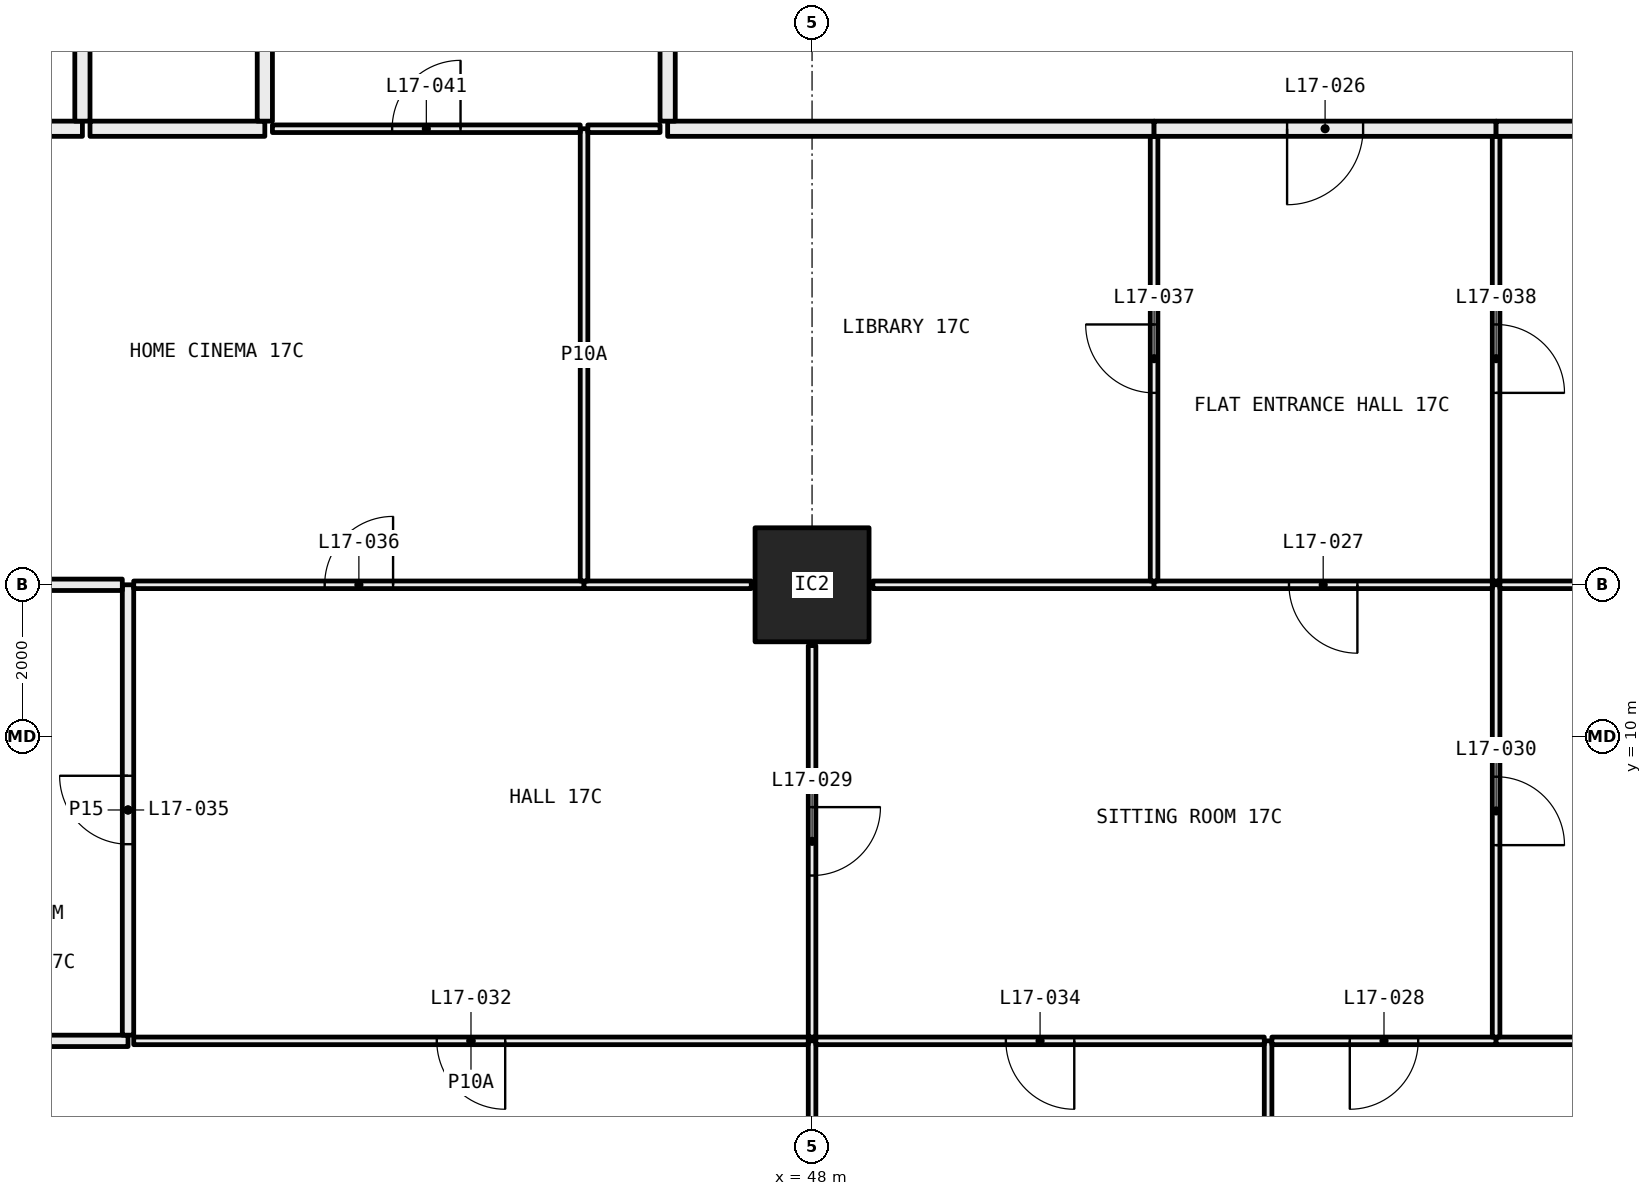
"""IFC4 building model, lengths in metres.
Left out: names, types, materials, properties, quantities, classifications, styles, units other than length and angle.
Written with IfcOpenShell. Run it as: python <this file> out.ifc"""

import sys

from ifc_helpers import new_model, si_unit, direction, frame, frame_2d, origin, origin_2d, place, context, subcontext, project, spatial, rectangle, hollow_rectangle, extrude, element, fill, save


model = new_model("IFC4")
c1 = context("Model", 3, precision=1e-05, world=origin(), true_north=direction((0.0, 1.0)))
c2 = subcontext(c1, "Body", "Model", "MODEL_VIEW")
j1 = project(units=[si_unit("LENGTHUNIT", "METRE"), si_unit("PLANEANGLEUNIT", "RADIAN")], contexts=[c1])
p1 = place(None, origin())
s1 = spatial("IfcSite", under=j1, at=p1, CompositionType="ELEMENT")
p2 = place(p1, origin())
s2 = spatial("IfcBuilding", under=s1, at=p2, CompositionType="ELEMENT")
p3 = place(p2, frame((0.0, 0.0, 71.4)))
s3 = spatial("IfcBuildingStorey", under=s2, at=p3, CompositionType="ELEMENT", Elevation=71.4)
p4 = place(p3, frame((48.0, 12.0, 0.0), z_axis=(0.0, 0.0, 1.0), x_axis=(1.0, 0.0, 0.0)))
e1 = element("IfcColumn", 1, at=p4, inside=s3, PredefinedType="COLUMN", context=c2, shape_type="SweptSolid", body=[
    extrude(hollow_rectangle(XDim=1.5, YDim=1.5, WallThickness=0.065, at=origin_2d()), origin(), (0.0, 0.0, 1.0), 3.05),
])
p5 = place(p3, frame((36.1, 18.0, 0.0), z_axis=(0.0, 0.0, 1.0), x_axis=(1.0, 0.0, 0.0)))
e2 = element("IfcWall", 2, at=p5, inside=s3, PredefinedType="PARTITIONING", context=c2, shape_type="SweptSolid", body=[
    extrude(rectangle(XDim=2.3, YDim=0.2, at=frame_2d((1.15, 0.0))), origin(), (0.0, 0.0, 1.0), 3.05),
])
p6 = place(p3, frame((38.4, 18.1, 0.0), z_axis=(0.0, 0.0, 1.0), x_axis=(0.0, 1.0, 0.0)))
e3 = element("IfcWall", 3, at=p6, inside=s3, PredefinedType="PARTITIONING", context=c2, shape_type="SweptSolid", body=[
    extrude(rectangle(XDim=6.2, YDim=0.2, at=frame_2d((3.1, 0.0))), origin(), (0.0, 0.0, 1.0), 2.45),
])
p7 = place(p3, frame((48.0, 0.72, 0.0), z_axis=(0.0, 0.0, 1.0), x_axis=(0.0, 1.0, 0.0)))
e4 = element("IfcWall", 4, at=p7, inside=s3, PredefinedType="PARTITIONING", context=c2, shape_type="SweptSolid", body=[
    extrude(rectangle(XDim=5.28, YDim=0.1, at=frame_2d((2.64, 0.0))), origin(), (0.0, 0.0, 1.0), 2.45),
])
p8 = place(p3, frame((39.0, 6.0, 0.0), z_axis=(0.0, 0.0, 1.0), x_axis=(-1.0, 0.0, 0.0)))
e5 = element("IfcWall", 5, at=p8, inside=s3, PredefinedType="PARTITIONING", context=c2, shape_type="SweptSolid", body=[
    extrude(rectangle(XDim=2.9, YDim=0.15, at=frame_2d((1.45, 0.0))), origin(), (0.0, 0.0, 1.0), 3.05),
])
p9 = place(p3, frame((47.95, 6.0, 0.0), z_axis=(0.0, 0.0, 1.0), x_axis=(-1.0, 0.0, 0.0)))
e6 = element("IfcWall", 6, at=p9, inside=s3, PredefinedType="PARTITIONING", context=c2, shape_type="SweptSolid", body=[
    extrude(rectangle(XDim=8.875, YDim=0.1, at=frame_2d((4.438, 0.0))), origin(), (0.0, 0.0, 1.0), 2.45),
])
p10 = place(p9, frame((3.988, 0.0, 0.0)))
e7 = element("IfcOpeningElement", 7, at=p10, cuts=e6, PredefinedType="OPENING", context=c2, shape_type="SweptSolid", body=[
    extrude(rectangle(XDim=0.9, YDim=2.1, at=frame_2d((0.45, 1.05))), frame((0.0, 0.06, 0.0), z_axis=(0.0, -1.0, 0.0), x_axis=(1.0, 0.0, 0.0)), (0.0, 0.0, 1.0), 0.12),
])
p11 = place(p3, frame((54.0, 0.72, 0.0), z_axis=(0.0, 0.0, 1.0), x_axis=(0.0, 1.0, 0.0)))
e8 = element("IfcWall", 8, at=p11, inside=s3, PredefinedType="PARTITIONING", context=c2, shape_type="SweptSolid", body=[
    extrude(rectangle(XDim=5.28, YDim=0.1, at=frame_2d((2.64, 0.0))), origin(), (0.0, 0.0, 1.0), 3.05),
])
p12 = place(p3, frame((53.95, 6.0, 0.0), z_axis=(0.0, 0.0, 1.0), x_axis=(-1.0, 0.0, 0.0)))
e9 = element("IfcWall", 9, at=p12, inside=s3, PredefinedType="PARTITIONING", context=c2, shape_type="SweptSolid", body=[
    extrude(rectangle(XDim=5.9, YDim=0.1, at=frame_2d((2.95, 0.0))), origin(), (0.0, 0.0, 1.0), 2.45),
])
p13 = place(p12, frame((2.5, 0.0, 0.0)))
e10 = element("IfcOpeningElement", 10, at=p13, cuts=e9, PredefinedType="OPENING", context=c2, shape_type="SweptSolid", body=[
    extrude(rectangle(XDim=0.9, YDim=2.1, at=frame_2d((0.45, 1.05))), frame((0.0, 0.06, 0.0), z_axis=(0.0, -1.0, 0.0), x_axis=(1.0, 0.0, 0.0)), (0.0, 0.0, 1.0), 0.12),
])
p14 = place(p3, frame((57.0, 6.0, 0.0), z_axis=(0.0, 0.0, 1.0), x_axis=(-1.0, 0.0, 0.0)))
e11 = element("IfcWall", 11, at=p14, inside=s3, PredefinedType="PARTITIONING", context=c2, shape_type="SweptSolid", body=[
    extrude(rectangle(XDim=2.95, YDim=0.1, at=frame_2d((1.475, 0.0))), origin(), (0.0, 0.0, 1.0), 3.05),
])
p15 = place(p14, frame((1.025, 0.0, 0.0)))
e12 = element("IfcOpeningElement", 12, at=p15, cuts=e11, PredefinedType="OPENING", context=c2, shape_type="SweptSolid", body=[
    extrude(rectangle(XDim=0.9, YDim=2.1, at=frame_2d((0.45, 1.05))), frame((0.0, 0.06, 0.0), z_axis=(0.0, -1.0, 0.0), x_axis=(1.0, 0.0, 0.0)), (0.0, 0.0, 1.0), 0.12),
])
p16 = place(p3, frame((59.95, 6.0, 0.0), z_axis=(0.0, 0.0, 1.0), x_axis=(-1.0, 0.0, 0.0)))
e13 = element("IfcWall", 13, at=p16, inside=s3, PredefinedType="PARTITIONING", context=c2, shape_type="SweptSolid", body=[
    extrude(rectangle(XDim=2.95, YDim=0.1, at=frame_2d((1.475, 0.0))), origin(), (0.0, 0.0, 1.0), 2.45),
])
p17 = place(p3, frame((39.0, 6.075, 0.0), z_axis=(0.0, 0.0, 1.0), x_axis=(0.0, 1.0, 0.0)))
e14 = element("IfcWall", 14, at=p17, inside=s3, PredefinedType="PARTITIONING", context=c2, shape_type="SweptSolid", body=[
    extrude(rectangle(XDim=5.925, YDim=0.15, at=frame_2d((2.962, 0.0))), origin(), (0.0, 0.0, 1.0), 2.45),
])
p18 = place(p17, frame((2.512, 0.0, 0.0)))
e15 = element("IfcOpeningElement", 15, at=p18, cuts=e14, PredefinedType="OPENING", context=c2, shape_type="SweptSolid", body=[
    extrude(rectangle(XDim=0.9, YDim=2.1, at=frame_2d((0.45, 1.05))), frame((0.0, 0.085, 0.0), z_axis=(0.0, -1.0, 0.0), x_axis=(1.0, 0.0, 0.0)), (0.0, 0.0, 1.0), 0.17),
])
p19 = place(p3, frame((38.925, 12.0, 0.0), z_axis=(0.0, 0.0, 1.0), x_axis=(-1.0, 0.0, 0.0)))
e16 = element("IfcWall", 16, at=p19, inside=s3, PredefinedType="PARTITIONING", context=c2, shape_type="SweptSolid", body=[
    extrude(rectangle(XDim=2.125, YDim=0.15, at=frame_2d((1.062, 0.0))), origin(), (0.0, 0.0, 1.0), 2.45),
])
p20 = place(p3, frame((48.0, 6.05, 0.0), z_axis=(0.0, 0.0, 1.0), x_axis=(0.0, 1.0, 0.0)))
e17 = element("IfcWall", 17, at=p20, inside=s3, PredefinedType="PARTITIONING", context=c2, shape_type="SweptSolid", body=[
    extrude(rectangle(XDim=5.15, YDim=0.1, at=frame_2d((2.575, 0.0))), origin(), (0.0, 0.0, 1.0), 2.45),
])
p21 = place(p20, frame((2.125, 0.0, 0.0)))
e18 = element("IfcOpeningElement", 18, at=p21, cuts=e17, PredefinedType="OPENING", context=c2, shape_type="SweptSolid", body=[
    extrude(rectangle(XDim=0.9, YDim=2.1, at=frame_2d((0.45, 1.05))), frame((0.0, 0.06, 0.0), z_axis=(0.0, -1.0, 0.0), x_axis=(1.0, 0.0, 0.0)), (0.0, 0.0, 1.0), 0.12),
])
p22 = place(p3, frame((45.0, 12.0, 0.0), z_axis=(0.0, 0.0, 1.0), x_axis=(-1.0, 0.0, 0.0)))
e19 = element("IfcWall", 19, at=p22, inside=s3, PredefinedType="PARTITIONING", context=c2, shape_type="SweptSolid", body=[
    extrude(rectangle(XDim=5.925, YDim=0.1, at=frame_2d((2.962, 0.0))), origin(), (0.0, 0.0, 1.0), 2.45),
])
p23 = place(p22, frame((2.512, 0.0, 0.0)))
e20 = element("IfcOpeningElement", 20, at=p23, cuts=e19, PredefinedType="OPENING", context=c2, shape_type="SweptSolid", body=[
    extrude(rectangle(XDim=0.9, YDim=2.1, at=frame_2d((0.45, 1.05))), frame((0.0, 0.06, 0.0), z_axis=(0.0, -1.0, 0.0), x_axis=(1.0, 0.0, 0.0)), (0.0, 0.0, 1.0), 0.12),
])
p24 = place(p3, frame((47.2, 12.0, 0.0), z_axis=(0.0, 0.0, 1.0), x_axis=(-1.0, 0.0, 0.0)))
e21 = element("IfcWall", 21, at=p24, inside=s3, PredefinedType="PARTITIONING", context=c2, shape_type="SweptSolid", body=[
    extrude(rectangle(XDim=2.2, YDim=0.1, at=frame_2d((1.1, 0.0))), origin(), (0.0, 0.0, 1.0), 2.45),
])
p25 = place(p3, frame((57.0, 6.05, 0.0), z_axis=(0.0, 0.0, 1.0), x_axis=(0.0, 1.0, 0.0)))
e22 = element("IfcWall", 22, at=p25, inside=s3, PredefinedType="PARTITIONING", context=c2, shape_type="SweptSolid", body=[
    extrude(rectangle(XDim=5.95, YDim=0.1, at=frame_2d((2.975, 0.0))), origin(), (0.0, 0.0, 1.0), 2.45),
])
p26 = place(p25, frame((2.525, 0.0, 0.0)))
e23 = element("IfcOpeningElement", 23, at=p26, cuts=e22, PredefinedType="OPENING", context=c2, shape_type="SweptSolid", body=[
    extrude(rectangle(XDim=0.9, YDim=2.1, at=frame_2d((0.45, 1.05))), frame((0.0, 0.06, 0.0), z_axis=(0.0, -1.0, 0.0), x_axis=(1.0, 0.0, 0.0)), (0.0, 0.0, 1.0), 0.12),
])
p27 = place(p3, frame((52.5, 12.0, 0.0), z_axis=(0.0, 0.0, 1.0), x_axis=(-1.0, 0.0, 0.0)))
e24 = element("IfcWall", 24, at=p27, inside=s3, PredefinedType="PARTITIONING", context=c2, shape_type="SweptSolid", body=[
    extrude(rectangle(XDim=3.7, YDim=0.1, at=frame_2d((1.85, 0.0))), origin(), (0.0, 0.0, 1.0), 2.45),
])
p28 = place(p3, frame((56.95, 12.0, 0.0), z_axis=(0.0, 0.0, 1.0), x_axis=(-1.0, 0.0, 0.0)))
e25 = element("IfcWall", 25, at=p28, inside=s3, PredefinedType="PARTITIONING", context=c2, shape_type="SweptSolid", body=[
    extrude(rectangle(XDim=4.45, YDim=0.1, at=frame_2d((2.225, 0.0))), origin(), (0.0, 0.0, 1.0), 2.45),
])
p29 = place(p28, frame((1.775, 0.0, 0.0)))
e26 = element("IfcOpeningElement", 26, at=p29, cuts=e25, PredefinedType="OPENING", context=c2, shape_type="SweptSolid", body=[
    extrude(rectangle(XDim=0.9, YDim=2.1, at=frame_2d((0.45, 1.05))), frame((0.0, 0.06, 0.0), z_axis=(0.0, -1.0, 0.0), x_axis=(1.0, 0.0, 0.0)), (0.0, 0.0, 1.0), 0.12),
])
p30 = place(p3, frame((59.2, 12.0, 0.0), z_axis=(0.0, 0.0, 1.0), x_axis=(-1.0, 0.0, 0.0)))
e27 = element("IfcWall", 27, at=p30, inside=s3, PredefinedType="PARTITIONING", context=c2, shape_type="SweptSolid", body=[
    extrude(rectangle(XDim=2.15, YDim=0.1, at=frame_2d((1.075, 0.0))), origin(), (0.0, 0.0, 1.0), 2.45),
])
p31 = place(p3, frame((45.0, 12.05, 0.0), z_axis=(0.0, 0.0, 1.0), x_axis=(0.0, 1.0, 0.0)))
e28 = element("IfcWall", 28, at=p31, inside=s3, PredefinedType="PARTITIONING", context=c2, shape_type="SweptSolid", body=[
    extrude(rectangle(XDim=5.95, YDim=0.1, at=frame_2d((2.975, 0.0))), origin(), (0.0, 0.0, 1.0), 2.45),
])
p32 = place(p3, frame((44.95, 18.0, 0.0), z_axis=(0.0, 0.0, 1.0), x_axis=(-1.0, 0.0, 0.0)))
e29 = element("IfcWall", 29, at=p32, inside=s3, PredefinedType="PARTITIONING", context=c2, shape_type="SweptSolid", body=[
    extrude(rectangle(XDim=4.05, YDim=0.1, at=frame_2d((2.025, 0.0))), origin(), (0.0, 0.0, 1.0), 3.05),
])
p33 = place(p32, frame((1.575, 0.0, 0.0)))
e30 = element("IfcOpeningElement", 30, at=p33, cuts=e29, PredefinedType="OPENING", context=c2, shape_type="SweptSolid", body=[
    extrude(rectangle(XDim=0.9, YDim=2.1, at=frame_2d((0.45, 1.05))), frame((0.0, 0.06, 0.0), z_axis=(0.0, -1.0, 0.0), x_axis=(1.0, 0.0, 0.0)), (0.0, 0.0, 1.0), 0.12),
])
p34 = place(p3, frame((40.8, 18.0, 0.0), z_axis=(0.0, 0.0, 1.0), x_axis=(-1.0, 0.0, 0.0)))
e31 = element("IfcWall", 31, at=p34, inside=s3, PredefinedType="PARTITIONING", context=c2, shape_type="SweptSolid", body=[
    extrude(rectangle(XDim=2.3, YDim=0.2, at=frame_2d((1.15, 0.0))), origin(), (0.0, 0.0, 1.0), 3.05),
])
p35 = place(p3, frame((52.5, 12.05, 0.0), z_axis=(0.0, 0.0, 1.0), x_axis=(0.0, 1.0, 0.0)))
e32 = element("IfcWall", 32, at=p35, inside=s3, PredefinedType="PARTITIONING", context=c2, shape_type="SweptSolid", body=[
    extrude(rectangle(XDim=5.85, YDim=0.1, at=frame_2d((2.925, 0.0))), origin(), (0.0, 0.0, 1.0), 2.45),
])
p36 = place(p35, frame((2.475, 0.0, 0.0)))
e33 = element("IfcOpeningElement", 33, at=p36, cuts=e32, PredefinedType="OPENING", context=c2, shape_type="SweptSolid", body=[
    extrude(rectangle(XDim=0.9, YDim=2.1, at=frame_2d((0.45, 1.05))), frame((0.0, 0.06, 0.0), z_axis=(0.0, -1.0, 0.0), x_axis=(1.0, 0.0, 0.0)), (0.0, 0.0, 1.0), 0.12),
])
p37 = place(p3, frame((46.0, 18.0, 0.0), z_axis=(0.0, 0.0, 1.0), x_axis=(-1.0, 0.0, 0.0)))
e34 = element("IfcWall", 34, at=p37, inside=s3, PredefinedType="PARTITIONING", context=c2, shape_type="SweptSolid", body=[
    extrude(rectangle(XDim=0.95, YDim=0.1, at=frame_2d((0.475, 0.0))), origin(), (0.0, 0.0, 1.0), 3.05),
])
p38 = place(p3, frame((52.5, 18.0, 0.0), z_axis=(0.0, 0.0, 1.0), x_axis=(-1.0, 0.0, 0.0)))
e35 = element("IfcWall", 35, at=p38, inside=s3, PredefinedType="PARTITIONING", context=c2, shape_type="SweptSolid", body=[
    extrude(rectangle(XDim=6.4, YDim=0.2, at=frame_2d((3.2, 0.0))), origin(), (0.0, 0.0, 1.0), 3.05),
])
p39 = place(p3, frame((57.0, 12.05, 0.0), z_axis=(0.0, 0.0, 1.0), x_axis=(0.0, 1.0, 0.0)))
e36 = element("IfcWall", 36, at=p39, inside=s3, PredefinedType="PARTITIONING", context=c2, shape_type="SweptSolid", body=[
    extrude(rectangle(XDim=5.85, YDim=0.1, at=frame_2d((2.925, 0.0))), origin(), (0.0, 0.0, 1.0), 2.45),
])
p40 = place(p39, frame((2.475, 0.0, 0.0)))
e37 = element("IfcOpeningElement", 37, at=p40, cuts=e36, PredefinedType="OPENING", context=c2, shape_type="SweptSolid", body=[
    extrude(rectangle(XDim=0.9, YDim=2.1, at=frame_2d((0.45, 1.05))), frame((0.0, 0.06, 0.0), z_axis=(0.0, -1.0, 0.0), x_axis=(1.0, 0.0, 0.0)), (0.0, 0.0, 1.0), 0.12),
])
p41 = place(p3, frame((57.0, 18.0, 0.0), z_axis=(0.0, 0.0, 1.0), x_axis=(-1.0, 0.0, 0.0)))
e38 = element("IfcWall", 38, at=p41, inside=s3, PredefinedType="PARTITIONING", context=c2, shape_type="SweptSolid", body=[
    extrude(rectangle(XDim=4.5, YDim=0.2, at=frame_2d((2.25, 0.0))), origin(), (0.0, 0.0, 1.0), 3.05),
])
p42 = place(p41, frame((1.75, 0.0, 0.0)))
e39 = element("IfcOpeningElement", 39, at=p42, cuts=e38, PredefinedType="OPENING", context=c2, shape_type="SweptSolid", body=[
    extrude(rectangle(XDim=1.0, YDim=2.1, at=frame_2d((0.5, 1.05))), frame((0.0, 0.11, 0.0), z_axis=(0.0, -1.0, 0.0), x_axis=(1.0, 0.0, 0.0)), (0.0, 0.0, 1.0), 0.22),
])
p43 = place(p3, frame((61.9, 18.0, 0.0), z_axis=(0.0, 0.0, 1.0), x_axis=(-1.0, 0.0, 0.0)))
e40 = element("IfcWall", 40, at=p43, inside=s3, PredefinedType="PARTITIONING", context=c2, shape_type="SweptSolid", body=[
    extrude(rectangle(XDim=4.9, YDim=0.2, at=frame_2d((2.45, 0.0))), origin(), (0.0, 0.0, 1.0), 3.05),
])
p44 = place(p3, frame((40.8, 23.9, 0.0), z_axis=(0.0, 0.0, 1.0), x_axis=(0.0, -1.0, 0.0)))
e41 = element("IfcWall", 41, at=p44, inside=s3, PredefinedType="PARTITIONING", context=c2, shape_type="SweptSolid", body=[
    extrude(rectangle(XDim=5.8, YDim=0.2, at=frame_2d((2.9, 0.0))), origin(), (0.0, 0.0, 1.0), 3.05),
])
p45 = place(p3, frame((46.1, 18.1, 0.0), z_axis=(0.0, 0.0, 1.0), x_axis=(0.0, 1.0, 0.0)))
e42 = element("IfcWall", 42, at=p45, inside=s3, PredefinedType="PARTITIONING", context=c2, shape_type="SweptSolid", body=[
    extrude(rectangle(XDim=6.2, YDim=0.2, at=frame_2d((3.1, 0.0))), origin(), (0.0, 0.0, 1.0), 2.45),
])
p46 = place(p42, origin())
e43 = element("IfcDoor", 43, at=p46, inside=s3, OperationType="SINGLE_SWING_LEFT", PredefinedType="DOOR", context=c2, shape_type="SweptSolid", body=[
    extrude(rectangle(XDim=1.0, YDim=2.1, at=frame_2d((0.5, 1.05))), frame((0.0, 0.025, 0.0), z_axis=(0.0, -1.0, 0.0), x_axis=(1.0, 0.0, 0.0)), (0.0, 0.0, 1.0), 0.05),
])
fill(e39, e43)
p47 = place(p29, origin())
e44 = element("IfcDoor", 44, at=p47, inside=s3, OperationType="SINGLE_SWING_RIGHT", PredefinedType="DOOR", context=c2, shape_type="SweptSolid", body=[
    extrude(rectangle(XDim=0.9, YDim=2.1, at=frame_2d((0.45, 1.05))), frame((0.0, 0.025, 0.0), z_axis=(0.0, -1.0, 0.0), x_axis=(1.0, 0.0, 0.0)), (0.0, 0.0, 1.0), 0.05),
])
fill(e26, e44)
p48 = place(p15, origin())
e45 = element("IfcDoor", 45, at=p48, inside=s3, OperationType="SINGLE_SWING_LEFT", PredefinedType="DOOR", context=c2, shape_type="SweptSolid", body=[
    extrude(rectangle(XDim=0.9, YDim=2.1, at=frame_2d((0.45, 1.05))), frame((0.0, 0.025, 0.0), z_axis=(0.0, -1.0, 0.0), x_axis=(1.0, 0.0, 0.0)), (0.0, 0.0, 1.0), 0.05),
])
fill(e12, e45)
p49 = place(p21, frame((0.9, 0.0, 0.0), x_axis=(-1.0, 0.0, 0.0)))
e46 = element("IfcDoor", 46, at=p49, inside=s3, OperationType="SINGLE_SWING_RIGHT", PredefinedType="DOOR", context=c2, shape_type="SweptSolid", body=[
    extrude(rectangle(XDim=0.9, YDim=2.1, at=frame_2d((0.45, 1.05))), frame((0.0, 0.025, 0.0), z_axis=(0.0, -1.0, 0.0), x_axis=(1.0, 0.0, 0.0)), (0.0, 0.0, 1.0), 0.05),
])
fill(e18, e46)
p50 = place(p26, frame((0.9, 0.0, 0.0), x_axis=(-1.0, 0.0, 0.0)))
e47 = element("IfcDoor", 47, at=p50, inside=s3, OperationType="SINGLE_SWING_LEFT", PredefinedType="DOOR", context=c2, shape_type="SweptSolid", body=[
    extrude(rectangle(XDim=0.9, YDim=2.1, at=frame_2d((0.45, 1.05))), frame((0.0, 0.025, 0.0), z_axis=(0.0, -1.0, 0.0), x_axis=(1.0, 0.0, 0.0)), (0.0, 0.0, 1.0), 0.05),
])
fill(e23, e47)
p51 = place(p10, origin())
e48 = element("IfcDoor", 48, at=p51, inside=s3, OperationType="SINGLE_SWING_RIGHT", PredefinedType="DOOR", context=c2, shape_type="SweptSolid", body=[
    extrude(rectangle(XDim=0.9, YDim=2.1, at=frame_2d((0.45, 1.05))), frame((0.0, 0.025, 0.0), z_axis=(0.0, -1.0, 0.0), x_axis=(1.0, 0.0, 0.0)), (0.0, 0.0, 1.0), 0.05),
])
fill(e7, e48)
p52 = place(p13, origin())
e49 = element("IfcDoor", 49, at=p52, inside=s3, OperationType="SINGLE_SWING_RIGHT", PredefinedType="DOOR", context=c2, shape_type="SweptSolid", body=[
    extrude(rectangle(XDim=0.9, YDim=2.1, at=frame_2d((0.45, 1.05))), frame((0.0, 0.025, 0.0), z_axis=(0.0, -1.0, 0.0), x_axis=(1.0, 0.0, 0.0)), (0.0, 0.0, 1.0), 0.05),
])
fill(e10, e49)
p53 = place(p18, origin())
e50 = element("IfcDoor", 50, at=p53, inside=s3, OperationType="SINGLE_SWING_LEFT", PredefinedType="DOOR", context=c2, shape_type="SweptSolid", body=[
    extrude(rectangle(XDim=0.9, YDim=2.1, at=frame_2d((0.45, 1.05))), frame((0.0, 0.025, 0.0), z_axis=(0.0, -1.0, 0.0), x_axis=(1.0, 0.0, 0.0)), (0.0, 0.0, 1.0), 0.05),
])
fill(e15, e50)
p54 = place(p23, frame((0.9, 0.0, 0.0), x_axis=(-1.0, 0.0, 0.0)))
e51 = element("IfcDoor", 51, at=p54, inside=s3, OperationType="SINGLE_SWING_LEFT", PredefinedType="DOOR", context=c2, shape_type="SweptSolid", body=[
    extrude(rectangle(XDim=0.9, YDim=2.1, at=frame_2d((0.45, 1.05))), frame((0.0, 0.025, 0.0), z_axis=(0.0, -1.0, 0.0), x_axis=(1.0, 0.0, 0.0)), (0.0, 0.0, 1.0), 0.05),
])
fill(e20, e51)
p55 = place(p36, origin())
e52 = element("IfcDoor", 52, at=p55, inside=s3, OperationType="SINGLE_SWING_LEFT", PredefinedType="DOOR", context=c2, shape_type="SweptSolid", body=[
    extrude(rectangle(XDim=0.9, YDim=2.1, at=frame_2d((0.45, 1.05))), frame((0.0, 0.025, 0.0), z_axis=(0.0, -1.0, 0.0), x_axis=(1.0, 0.0, 0.0)), (0.0, 0.0, 1.0), 0.05),
])
fill(e33, e52)
p56 = place(p40, frame((0.9, 0.0, 0.0), x_axis=(-1.0, 0.0, 0.0)))
e53 = element("IfcDoor", 53, at=p56, inside=s3, OperationType="SINGLE_SWING_LEFT", PredefinedType="DOOR", context=c2, shape_type="SweptSolid", body=[
    extrude(rectangle(XDim=0.9, YDim=2.1, at=frame_2d((0.45, 1.05))), frame((0.0, 0.025, 0.0), z_axis=(0.0, -1.0, 0.0), x_axis=(1.0, 0.0, 0.0)), (0.0, 0.0, 1.0), 0.05),
])
fill(e37, e53)
p57 = place(p33, frame((0.9, 0.0, 0.0), x_axis=(-1.0, 0.0, 0.0)))
e54 = element("IfcDoor", 54, at=p57, inside=s3, OperationType="SINGLE_SWING_LEFT", PredefinedType="DOOR", context=c2, shape_type="SweptSolid", body=[
    extrude(rectangle(XDim=0.9, YDim=2.1, at=frame_2d((0.45, 1.05))), frame((0.0, 0.025, 0.0), z_axis=(0.0, -1.0, 0.0), x_axis=(1.0, 0.0, 0.0)), (0.0, 0.0, 1.0), 0.05),
])
fill(e30, e54)
save(model, sys.argv[1])
